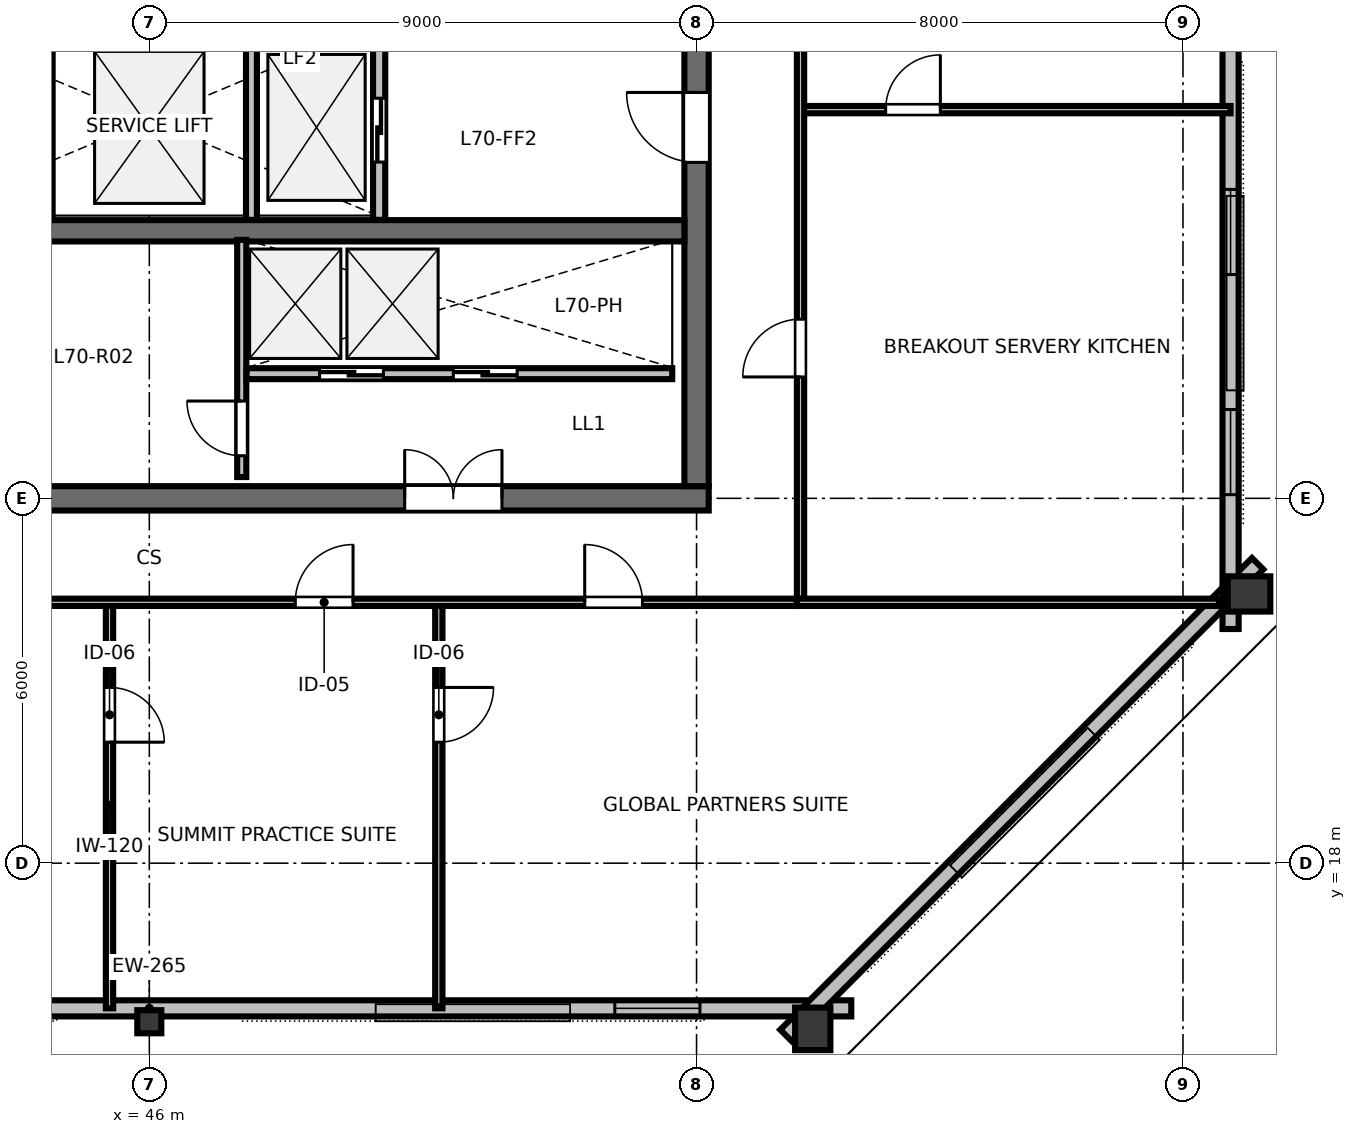
"""IFC4 building model, lengths in metres.
Left out: names, types, materials, properties, quantities, classifications, styles, units other than length and angle.
Written with IfcOpenShell. Run it as: python <this file> out.ifc"""

import sys

from ifc_helpers import new_model, si_unit, direction, frame, frame_2d, origin, origin_2d, place, context, subcontext, project, spatial, rectangle, hollow_rectangle, i_section, extrude, element, fill, save


model = new_model("IFC4")
c1 = context("Model", 3, precision=1e-05, world=origin(), true_north=direction((0.0, 1.0)))
c2 = subcontext(c1, "Body", "Model", "MODEL_VIEW")
j1 = project(units=[si_unit("LENGTHUNIT", "METRE"), si_unit("PLANEANGLEUNIT", "RADIAN")], contexts=[c1])
p1 = place(None, origin())
s1 = spatial("IfcSite", under=j1, at=p1, CompositionType="ELEMENT")
p2 = place(p1, origin())
s2 = spatial("IfcBuilding", under=s1, at=p2, CompositionType="ELEMENT")
p3 = place(p2, frame((0.0, 0.0, 264.6)))
s3 = spatial("IfcBuildingStorey", under=s2, at=p3, CompositionType="ELEMENT", Elevation=264.6)
p4 = place(p3, frame((36.8, 24.0, 0.0), z_axis=(0.0, 0.0, 1.0), x_axis=(1.0, 0.0, 0.0)))
e1 = element("IfcWall", 1, at=p4, inside=s3, PredefinedType="SHEAR", context=c2, shape_type="SweptSolid", body=[
    extrude(rectangle(XDim=18.4, YDim=0.4, at=frame_2d((9.2, 0.0))), origin(), (0.0, 0.0, 1.0), 3.36),
])
p5 = place(p4, frame((13.4, 0.0, 0.0)))
e2 = element("IfcOpeningElement", 2, at=p5, cuts=e1, PredefinedType="OPENING", context=c2, shape_type="SweptSolid", body=[
    extrude(rectangle(XDim=1.6, YDim=2.15, at=frame_2d((0.8, 1.075))), frame((0.0, 0.21, 0.0), z_axis=(0.0, -1.0, 0.0), x_axis=(1.0, 0.0, 0.0)), (0.0, 0.0, 1.0), 0.42),
])
p6 = place(p3, frame((55.0, 24.2, 0.0), z_axis=(0.0, 0.0, 1.0), x_axis=(0.0, 1.0, 0.0)))
e3 = element("IfcWall", 3, at=p6, inside=s3, PredefinedType="SHEAR", context=c2, shape_type="SweptSolid", body=[
    extrude(rectangle(XDim=15.6, YDim=0.4, at=frame_2d((7.8, 0.0))), origin(), (0.0, 0.0, 1.0), 3.36),
])
p7 = place(p6, frame((5.325, 0.0, 0.0)))
e4 = element("IfcOpeningElement", 4, at=p7, cuts=e3, PredefinedType="OPENING", context=c2, shape_type="SweptSolid", body=[
    extrude(rectangle(XDim=1.15, YDim=2.15, at=frame_2d((0.575, 1.075))), frame((0.0, 0.21, 0.0), z_axis=(0.0, -1.0, 0.0), x_axis=(1.0, 0.0, 0.0)), (0.0, 0.0, 1.0), 0.42),
])
p8 = place(p3, frame((37.2, 28.4, 0.0), z_axis=(0.0, 0.0, 1.0), x_axis=(1.0, 0.0, 0.0)))
e5 = element("IfcWall", 5, at=p8, inside=s3, PredefinedType="SHEAR", context=c2, shape_type="SweptSolid", body=[
    extrude(rectangle(XDim=17.6, YDim=0.35, at=frame_2d((8.8, 0.0))), origin(), (0.0, 0.0, 1.0), 3.36),
])
p9 = place(p3, frame((46.0, 15.393, 0.0), z_axis=(0.0, 0.0, 1.0), x_axis=(1.0, 0.0, 0.0)))
e6 = element("IfcColumn", 6, at=p9, inside=s3, PredefinedType="COLUMN", context=c2, shape_type="SweptSolid", body=[
    extrude(i_section(OverallWidth=0.395, OverallDepth=0.38, WebThickness=0.019, FlangeThickness=0.03, FilletRadius=0.025, at=origin_2d()), origin(), (0.0, 0.0, 1.0), 3.373),
])
for number, where, z_axis, x_axis in (
    (7, (56.911, 15.276, 0.0), (0.0, 0.0, 1.0), (1.0, 0.0, 0.0)),
    (8, (64.086, 22.428, 0.0), (0.0, 0.0, 1.0), (0.0, 1.0, 0.0)),
):
    element("IfcColumn", number, at=place(p3, frame(where, z_axis=z_axis, x_axis=x_axis)), inside=s3, PredefinedType="COLUMN", context=c2, shape_type="SweptSolid", body=[
        extrude(hollow_rectangle(XDim=0.58, YDim=0.7, WallThickness=0.032, at=origin_2d()), origin(), (0.0, 0.0, 1.0), 3.373),
    ])
p10 = place(p3, frame((34.456, 15.613, 0.0), z_axis=(0.0, 0.0, 1.0), x_axis=(1.0, 0.0, 0.0)))
e9 = element("IfcWall", 9, at=p10, inside=s3, PredefinedType="STANDARD", context=c2, shape_type="SweptSolid", body=[
    extrude(rectangle(XDim=23.089, YDim=0.265, at=frame_2d((11.544, 0.0))), origin(), (0.0, 0.0, 1.0), 2.832),
])
p11 = place(p10, frame((2.489, 0.0, 0.85)))
e10 = element("IfcOpeningElement", 10, at=p11, cuts=e9, PredefinedType="OPENING", context=c2, shape_type="SweptSolid", body=[
    extrude(rectangle(XDim=1.4, YDim=1.2, at=frame_2d((0.7, 0.6))), frame((0.0, 0.142, 0.0), z_axis=(0.0, -1.0, 0.0), x_axis=(1.0, 0.0, 0.0)), (0.0, 0.0, 1.0), 0.285),
])
p12 = place(p10, frame((6.667, 0.0, 0.85)))
e11 = element("IfcOpeningElement", 11, at=p12, cuts=e9, PredefinedType="OPENING", context=c2, shape_type="SweptSolid", body=[
    extrude(rectangle(XDim=1.4, YDim=1.2, at=frame_2d((0.7, 0.6))), frame((0.0, 0.142, 0.0), z_axis=(0.0, -1.0, 0.0), x_axis=(1.0, 0.0, 0.0)), (0.0, 0.0, 1.0), 0.285),
])
p13 = place(p10, frame((19.2, 0.0, 0.85)))
e12 = element("IfcOpeningElement", 12, at=p13, cuts=e9, PredefinedType="OPENING", context=c2, shape_type="SweptSolid", body=[
    extrude(rectangle(XDim=1.4, YDim=1.2, at=frame_2d((0.7, 0.6))), frame((0.0, 0.142, 0.0), z_axis=(0.0, -1.0, 0.0), x_axis=(1.0, 0.0, 0.0)), (0.0, 0.0, 1.0), 0.285),
])
p14 = place(p3, frame((56.47, 15.168, 0.0), z_axis=(0.0, 0.0, 1.0), x_axis=(0.707106781187, 0.707106781187, 0.0)))
e13 = element("IfcWall", 13, at=p14, inside=s3, PredefinedType="STANDARD", context=c2, shape_type="SweptSolid", body=[
    extrude(rectangle(XDim=10.971, YDim=0.265, at=frame_2d((5.485, 0.0))), origin(), (0.0, 0.0, 1.0), 2.832),
])
p15 = place(p3, frame((63.783, 21.851, 0.0), z_axis=(0.0, 0.0, 1.0), x_axis=(0.0, 1.0, 0.0)))
e14 = element("IfcWall", 14, at=p15, inside=s3, PredefinedType="STANDARD", context=c2, shape_type="SweptSolid", body=[
    extrude(rectangle(XDim=20.298, YDim=0.265, at=frame_2d((10.149, 0.0))), origin(), (0.0, 0.0, 1.0), 2.832),
])
p16 = place(p15, frame((2.21, 0.0, 0.85)))
e15 = element("IfcOpeningElement", 15, at=p16, cuts=e14, PredefinedType="OPENING", context=c2, shape_type="SweptSolid", body=[
    extrude(rectangle(XDim=1.4, YDim=1.2, at=frame_2d((0.7, 0.6))), frame((0.0, 0.142, 0.0), z_axis=(0.0, -1.0, 0.0), x_axis=(1.0, 0.0, 0.0)), (0.0, 0.0, 1.0), 0.285),
])
p17 = place(p15, frame((5.83, 0.0, 0.85)))
e16 = element("IfcOpeningElement", 16, at=p17, cuts=e14, PredefinedType="OPENING", context=c2, shape_type="SweptSolid", body=[
    extrude(rectangle(XDim=1.4, YDim=1.2, at=frame_2d((0.7, 0.6))), frame((0.0, 0.142, 0.0), z_axis=(0.0, -1.0, 0.0), x_axis=(1.0, 0.0, 0.0)), (0.0, 0.0, 1.0), 0.285),
])
p18 = place(p15, frame((13.069, 0.0, 0.85)))
e17 = element("IfcOpeningElement", 17, at=p18, cuts=e14, PredefinedType="OPENING", context=c2, shape_type="SweptSolid", body=[
    extrude(rectangle(XDim=1.4, YDim=1.2, at=frame_2d((0.7, 0.6))), frame((0.0, 0.142, 0.0), z_axis=(0.0, -1.0, 0.0), x_axis=(1.0, 0.0, 0.0)), (0.0, 0.0, 1.0), 0.285),
])
p19 = place(p15, frame((16.688, 0.0, 0.85)))
e18 = element("IfcOpeningElement", 18, at=p19, cuts=e14, PredefinedType="OPENING", context=c2, shape_type="SweptSolid", body=[
    extrude(rectangle(XDim=1.4, YDim=1.2, at=frame_2d((0.7, 0.6))), frame((0.0, 0.142, 0.0), z_axis=(0.0, -1.0, 0.0), x_axis=(1.0, 0.0, 0.0)), (0.0, 0.0, 1.0), 0.285),
])
p20 = place(p3, frame((49.78, 28.58, 0.0), z_axis=(0.0, 0.0, 1.0), x_axis=(0.0, 1.0, 0.0)))
e19 = element("IfcWall", 19, at=p20, inside=s3, PredefinedType="PARTITIONING", context=c2, shape_type="SweptSolid", body=[
    extrude(rectangle(XDim=3.04, YDim=0.2, at=frame_2d((1.52, 0.0))), origin(), (0.0, 0.0, 1.0), 3.375),
])
p21 = place(p20, frame((0.95, 0.0, 0.0)))
e20 = element("IfcOpeningElement", 20, at=p21, cuts=e19, PredefinedType="OPENING", context=c2, shape_type="SweptSolid", body=[
    extrude(rectangle(XDim=1.05, YDim=2.15, at=frame_2d((0.525, 1.075))), frame((0.0, 0.11, 0.0), z_axis=(0.0, -1.0, 0.0), x_axis=(1.0, 0.0, 0.0)), (0.0, 0.0, 1.0), 0.22),
])
for number, where, z_axis, x_axis in (
    (21, (44.32, 28.58, 0.0), (0.0, 0.0, 1.0), (0.0, 1.0, 0.0)),
    (22, (47.68, 28.58, 0.0), (0.0, 0.0, 1.0), (0.0, 1.0, 0.0)),
):
    element("IfcWall", number, at=place(p3, frame(where, z_axis=z_axis, x_axis=x_axis)), inside=s3, PredefinedType="PARTITIONING", context=c2, shape_type="SweptSolid", body=[
        extrude(rectangle(XDim=3.04, YDim=0.18, at=frame_2d((1.52, 0.0))), origin(), (0.0, 0.0, 1.0), 3.375),
    ])
p22 = place(p3, frame((47.52, 24.35, 0.0), z_axis=(0.0, 0.0, 1.0), x_axis=(0.0, 1.0, 0.0)))
e23 = element("IfcWall", 23, at=p22, inside=s3, PredefinedType="PARTITIONING", context=c2, shape_type="SweptSolid", body=[
    extrude(rectangle(XDim=3.9, YDim=0.15, at=frame_2d((1.95, 0.0))), origin(), (0.0, 0.0, 1.0), 3.375),
])
p23 = place(p22, frame((0.35, 0.0, 0.0)))
e24 = element("IfcOpeningElement", 24, at=p23, cuts=e23, PredefinedType="OPENING", context=c2, shape_type="SweptSolid", body=[
    extrude(rectangle(XDim=0.9, YDim=2.15, at=frame_2d((0.45, 1.075))), frame((0.0, 0.085, 0.0), z_axis=(0.0, -1.0, 0.0), x_axis=(1.0, 0.0, 0.0)), (0.0, 0.0, 1.0), 0.17),
])
p24 = place(p3, frame((47.6, 26.05, 0.0), z_axis=(0.0, 0.0, 1.0), x_axis=(1.0, 0.0, 0.0)))
e25 = element("IfcWall", 25, at=p24, inside=s3, PredefinedType="PARTITIONING", context=c2, shape_type="SweptSolid", body=[
    extrude(rectangle(XDim=7.0, YDim=0.18, at=frame_2d((3.5, 0.0))), origin(), (0.0, 0.0, 1.0), 3.375),
])
p25 = place(p24, frame((1.2, 0.0, 0.0)))
e26 = element("IfcOpeningElement", 26, at=p25, cuts=e25, PredefinedType="OPENING", context=c2, shape_type="SweptSolid", body=[
    extrude(rectangle(XDim=1.05, YDim=2.15, at=frame_2d((0.525, 1.075))), frame((0.0, 0.1, 0.0), z_axis=(0.0, -1.0, 0.0), x_axis=(1.0, 0.0, 0.0)), (0.0, 0.0, 1.0), 0.2),
])
p26 = place(p24, frame((3.4, 0.0, 0.0)))
e27 = element("IfcOpeningElement", 27, at=p26, cuts=e25, PredefinedType="OPENING", context=c2, shape_type="SweptSolid", body=[
    extrude(rectangle(XDim=1.05, YDim=2.15, at=frame_2d((0.525, 1.075))), frame((0.0, 0.1, 0.0), z_axis=(0.0, -1.0, 0.0), x_axis=(1.0, 0.0, 0.0)), (0.0, 0.0, 1.0), 0.2),
])
p27 = place(p3, frame((45.345, 22.29, 0.0), z_axis=(0.0, 0.0, 1.0), x_axis=(0.0, -1.0, 0.0)))
e28 = element("IfcWall", 28, at=p27, inside=s3, PredefinedType="PARTITIONING", context=c2, shape_type="SweptSolid", body=[
    extrude(rectangle(XDim=6.677, YDim=0.12, at=frame_2d((3.339, 0.0))), origin(), (0.0, 0.0, 1.0), 2.655),
])
p28 = place(p27, frame((1.4, 0.0, 0.0)))
e29 = element("IfcOpeningElement", 29, at=p28, cuts=e28, PredefinedType="OPENING", context=c2, shape_type="SweptSolid", body=[
    extrude(rectangle(XDim=0.9, YDim=2.15, at=frame_2d((0.45, 1.075))), frame((0.0, 0.07, 0.0), z_axis=(0.0, -1.0, 0.0), x_axis=(1.0, 0.0, 0.0)), (0.0, 0.0, 1.0), 0.14),
])
p29 = place(p3, frame((50.761, 22.29, 0.0), z_axis=(0.0, 0.0, 1.0), x_axis=(0.0, -1.0, 0.0)))
e30 = element("IfcWall", 30, at=p29, inside=s3, PredefinedType="PARTITIONING", context=c2, shape_type="SweptSolid", body=[
    extrude(rectangle(XDim=6.677, YDim=0.12, at=frame_2d((3.339, 0.0))), origin(), (0.0, 0.0, 1.0), 2.655),
])
p30 = place(p29, frame((1.4, 0.0, 0.0)))
e31 = element("IfcOpeningElement", 31, at=p30, cuts=e30, PredefinedType="OPENING", context=c2, shape_type="SweptSolid", body=[
    extrude(rectangle(XDim=0.9, YDim=2.15, at=frame_2d((0.45, 1.075))), frame((0.0, 0.07, 0.0), z_axis=(0.0, -1.0, 0.0), x_axis=(1.0, 0.0, 0.0)), (0.0, 0.0, 1.0), 0.14),
])
p31 = place(p3, frame((35.35, 22.29, 0.0), z_axis=(0.0, 0.0, 1.0), x_axis=(1.0, 0.0, 0.0)))
e32 = element("IfcWall", 32, at=p31, inside=s3, PredefinedType="PARTITIONING", context=c2, shape_type="SweptSolid", body=[
    extrude(rectangle(XDim=21.3, YDim=0.12, at=frame_2d((10.65, 0.0))), origin(), (0.0, 0.0, 1.0), 2.655),
])
p32 = place(p31, frame((4.425, 0.0, 0.0)))
e33 = element("IfcOpeningElement", 33, at=p32, cuts=e32, PredefinedType="OPENING", context=c2, shape_type="SweptSolid", body=[
    extrude(rectangle(XDim=0.95, YDim=2.15, at=frame_2d((0.475, 1.075))), frame((0.0, 0.07, 0.0), z_axis=(0.0, -1.0, 0.0), x_axis=(1.0, 0.0, 0.0)), (0.0, 0.0, 1.0), 0.14),
])
p33 = place(p31, frame((13.051, 0.0, 0.0)))
e34 = element("IfcOpeningElement", 34, at=p33, cuts=e32, PredefinedType="OPENING", context=c2, shape_type="SweptSolid", body=[
    extrude(rectangle(XDim=0.95, YDim=2.15, at=frame_2d((0.475, 1.075))), frame((0.0, 0.07, 0.0), z_axis=(0.0, -1.0, 0.0), x_axis=(1.0, 0.0, 0.0)), (0.0, 0.0, 1.0), 0.14),
])
p34 = place(p31, frame((17.811, 0.0, 0.0)))
e35 = element("IfcOpeningElement", 35, at=p34, cuts=e32, PredefinedType="OPENING", context=c2, shape_type="SweptSolid", body=[
    extrude(rectangle(XDim=0.95, YDim=2.15, at=frame_2d((0.475, 1.075))), frame((0.0, 0.07, 0.0), z_axis=(0.0, -1.0, 0.0), x_axis=(1.0, 0.0, 0.0)), (0.0, 0.0, 1.0), 0.14),
])
p35 = place(p3, frame((56.71, 30.392, 0.0), z_axis=(0.0, 0.0, 1.0), x_axis=(1.0, 0.0, 0.0)))
e36 = element("IfcWall", 36, at=p35, inside=s3, PredefinedType="PARTITIONING", context=c2, shape_type="SweptSolid", body=[
    extrude(rectangle(XDim=7.073, YDim=0.12, at=frame_2d((3.536, 0.0))), origin(), (0.0, 0.0, 1.0), 2.655),
])
p36 = place(p35, frame((1.4, 0.0, 0.0)))
e37 = element("IfcOpeningElement", 37, at=p36, cuts=e36, PredefinedType="OPENING", context=c2, shape_type="SweptSolid", body=[
    extrude(rectangle(XDim=0.9, YDim=2.15, at=frame_2d((0.45, 1.075))), frame((0.0, 0.07, 0.0), z_axis=(0.0, -1.0, 0.0), x_axis=(1.0, 0.0, 0.0)), (0.0, 0.0, 1.0), 0.14),
])
p37 = place(p3, frame((56.71, 22.35, 0.0), z_axis=(0.0, 0.0, 1.0), x_axis=(0.0, 1.0, 0.0)))
e38 = element("IfcWall", 38, at=p37, inside=s3, PredefinedType="PARTITIONING", context=c2, shape_type="SweptSolid", body=[
    extrude(rectangle(XDim=19.3, YDim=0.12, at=frame_2d((9.65, 0.0))), origin(), (0.0, 0.0, 1.0), 2.655),
])
p38 = place(p37, frame((3.646, 0.0, 0.0)))
e39 = element("IfcOpeningElement", 39, at=p38, cuts=e38, PredefinedType="OPENING", context=c2, shape_type="SweptSolid", body=[
    extrude(rectangle(XDim=0.95, YDim=2.15, at=frame_2d((0.475, 1.075))), frame((0.0, 0.07, 0.0), z_axis=(0.0, -1.0, 0.0), x_axis=(1.0, 0.0, 0.0)), (0.0, 0.0, 1.0), 0.14),
])
p39 = place(p37, frame((13.096, 0.0, 0.0)))
e40 = element("IfcOpeningElement", 40, at=p39, cuts=e38, PredefinedType="OPENING", context=c2, shape_type="SweptSolid", body=[
    extrude(rectangle(XDim=0.95, YDim=2.15, at=frame_2d((0.475, 1.075))), frame((0.0, 0.07, 0.0), z_axis=(0.0, -1.0, 0.0), x_axis=(1.0, 0.0, 0.0)), (0.0, 0.0, 1.0), 0.14),
])
p40 = place(p3, frame((56.65, 22.29, 0.0), z_axis=(0.0, 0.0, 1.0), x_axis=(1.0, 0.0, 0.0)))
e41 = element("IfcWall", 41, at=p40, inside=s3, PredefinedType="PARTITIONING", context=c2, shape_type="SweptSolid", body=[
    extrude(rectangle(XDim=6.942, YDim=0.12, at=frame_2d((3.471, 0.0))), origin(), (0.0, 0.0, 1.0), 2.655),
])
p41 = place(p13, origin())
e42 = element("IfcWindow", 42, at=p41, inside=s3, PartitioningType="SINGLE_PANEL", PredefinedType="WINDOW", context=c2, shape_type="SweptSolid", body=[
    extrude(rectangle(XDim=1.4, YDim=1.2, at=frame_2d((0.7, 0.6))), frame((0.0, 0.03, 0.0), z_axis=(0.0, -1.0, 0.0), x_axis=(1.0, 0.0, 0.0)), (0.0, 0.0, 1.0), 0.06),
])
fill(e12, e42)
p42 = place(p16, origin())
e43 = element("IfcWindow", 43, at=p42, inside=s3, PartitioningType="SINGLE_PANEL", PredefinedType="WINDOW", context=c2, shape_type="SweptSolid", body=[
    extrude(rectangle(XDim=1.4, YDim=1.2, at=frame_2d((0.7, 0.6))), frame((0.0, 0.03, 0.0), z_axis=(0.0, -1.0, 0.0), x_axis=(1.0, 0.0, 0.0)), (0.0, 0.0, 1.0), 0.06),
])
fill(e15, e43)
p43 = place(p17, origin())
e44 = element("IfcWindow", 44, at=p43, inside=s3, PartitioningType="SINGLE_PANEL", PredefinedType="WINDOW", context=c2, shape_type="SweptSolid", body=[
    extrude(rectangle(XDim=1.4, YDim=1.2, at=frame_2d((0.7, 0.6))), frame((0.0, 0.03, 0.0), z_axis=(0.0, -1.0, 0.0), x_axis=(1.0, 0.0, 0.0)), (0.0, 0.0, 1.0), 0.06),
])
fill(e16, e44)
p44 = place(p7, origin())
e45 = element("IfcDoor", 45, at=p44, inside=s3, OperationType="SINGLE_SWING_RIGHT", PredefinedType="DOOR", context=c2, shape_type="SweptSolid", body=[
    extrude(rectangle(XDim=1.15, YDim=2.15, at=frame_2d((0.575, 1.075))), frame((0.0, 0.025, 0.0), z_axis=(0.0, -1.0, 0.0), x_axis=(1.0, 0.0, 0.0)), (0.0, 0.0, 1.0), 0.05),
])
fill(e4, e45)
p45 = place(p5, origin())
e46 = element("IfcDoor", 46, at=p45, inside=s3, OperationType="DOUBLE_DOOR_SINGLE_SWING", PredefinedType="DOOR", context=c2, shape_type="SweptSolid", body=[
    extrude(rectangle(XDim=1.6, YDim=2.15, at=frame_2d((0.8, 1.075))), frame((0.0, 0.025, 0.0), z_axis=(0.0, -1.0, 0.0), x_axis=(1.0, 0.0, 0.0)), (0.0, 0.0, 1.0), 0.05),
])
fill(e2, e46)
p46 = place(p21, origin())
e47 = element("IfcDoor", 47, at=p46, inside=s3, OperationType="SLIDING_TO_RIGHT", PredefinedType="DOOR", context=c2, shape_type="SweptSolid", body=[
    extrude(rectangle(XDim=1.05, YDim=2.15, at=frame_2d((0.525, 1.075))), frame((0.0, 0.025, 0.0), z_axis=(0.0, -1.0, 0.0), x_axis=(1.0, 0.0, 0.0)), (0.0, 0.0, 1.0), 0.05),
])
fill(e20, e47)
p47 = place(p23, origin())
e48 = element("IfcDoor", 48, at=p47, inside=s3, OperationType="SINGLE_SWING_RIGHT", PredefinedType="DOOR", context=c2, shape_type="SweptSolid", body=[
    extrude(rectangle(XDim=0.9, YDim=2.15, at=frame_2d((0.45, 1.075))), frame((0.0, 0.025, 0.0), z_axis=(0.0, -1.0, 0.0), x_axis=(1.0, 0.0, 0.0)), (0.0, 0.0, 1.0), 0.05),
])
fill(e24, e48)
p48 = place(p25, origin())
e49 = element("IfcDoor", 49, at=p48, inside=s3, OperationType="SLIDING_TO_LEFT", PredefinedType="DOOR", context=c2, shape_type="SweptSolid", body=[
    extrude(rectangle(XDim=1.05, YDim=2.15, at=frame_2d((0.525, 1.075))), frame((0.0, 0.025, 0.0), z_axis=(0.0, -1.0, 0.0), x_axis=(1.0, 0.0, 0.0)), (0.0, 0.0, 1.0), 0.05),
])
fill(e26, e49)
p49 = place(p26, origin())
e50 = element("IfcDoor", 50, at=p49, inside=s3, OperationType="SLIDING_TO_RIGHT", PredefinedType="DOOR", context=c2, shape_type="SweptSolid", body=[
    extrude(rectangle(XDim=1.05, YDim=2.15, at=frame_2d((0.525, 1.075))), frame((0.0, 0.025, 0.0), z_axis=(0.0, -1.0, 0.0), x_axis=(1.0, 0.0, 0.0)), (0.0, 0.0, 1.0), 0.05),
])
fill(e27, e50)
p50 = place(p28, origin())
e51 = element("IfcDoor", 51, at=p50, inside=s3, OperationType="SINGLE_SWING_RIGHT", PredefinedType="DOOR", context=c2, shape_type="SweptSolid", body=[
    extrude(rectangle(XDim=0.9, YDim=2.15, at=frame_2d((0.45, 1.075))), frame((0.0, 0.025, 0.0), z_axis=(0.0, -1.0, 0.0), x_axis=(1.0, 0.0, 0.0)), (0.0, 0.0, 1.0), 0.05),
])
fill(e29, e51)
p51 = place(p30, origin())
e52 = element("IfcDoor", 52, at=p51, inside=s3, OperationType="SINGLE_SWING_LEFT", PredefinedType="DOOR", context=c2, shape_type="SweptSolid", body=[
    extrude(rectangle(XDim=0.9, YDim=2.15, at=frame_2d((0.45, 1.075))), frame((0.0, 0.025, 0.0), z_axis=(0.0, -1.0, 0.0), x_axis=(1.0, 0.0, 0.0)), (0.0, 0.0, 1.0), 0.05),
])
fill(e31, e52)
p52 = place(p33, origin())
e53 = element("IfcDoor", 53, at=p52, inside=s3, OperationType="SINGLE_SWING_RIGHT", PredefinedType="DOOR", context=c2, shape_type="SweptSolid", body=[
    extrude(rectangle(XDim=0.95, YDim=2.15, at=frame_2d((0.475, 1.075))), frame((0.0, 0.025, 0.0), z_axis=(0.0, -1.0, 0.0), x_axis=(1.0, 0.0, 0.0)), (0.0, 0.0, 1.0), 0.05),
])
fill(e34, e53)
p53 = place(p34, origin())
e54 = element("IfcDoor", 54, at=p53, inside=s3, OperationType="SINGLE_SWING_LEFT", PredefinedType="DOOR", context=c2, shape_type="SweptSolid", body=[
    extrude(rectangle(XDim=0.95, YDim=2.15, at=frame_2d((0.475, 1.075))), frame((0.0, 0.025, 0.0), z_axis=(0.0, -1.0, 0.0), x_axis=(1.0, 0.0, 0.0)), (0.0, 0.0, 1.0), 0.05),
])
fill(e35, e54)
p54 = place(p36, origin())
e55 = element("IfcDoor", 55, at=p54, inside=s3, OperationType="SINGLE_SWING_RIGHT", PredefinedType="DOOR", context=c2, shape_type="SweptSolid", body=[
    extrude(rectangle(XDim=0.9, YDim=2.15, at=frame_2d((0.45, 1.075))), frame((0.0, 0.025, 0.0), z_axis=(0.0, -1.0, 0.0), x_axis=(1.0, 0.0, 0.0)), (0.0, 0.0, 1.0), 0.05),
])
fill(e37, e55)
p55 = place(p38, origin())
e56 = element("IfcDoor", 56, at=p55, inside=s3, OperationType="SINGLE_SWING_LEFT", PredefinedType="DOOR", context=c2, shape_type="SweptSolid", body=[
    extrude(rectangle(XDim=0.95, YDim=2.15, at=frame_2d((0.475, 1.075))), frame((0.0, 0.025, 0.0), z_axis=(0.0, -1.0, 0.0), x_axis=(1.0, 0.0, 0.0)), (0.0, 0.0, 1.0), 0.05),
])
fill(e39, e56)
save(model, sys.argv[1])
